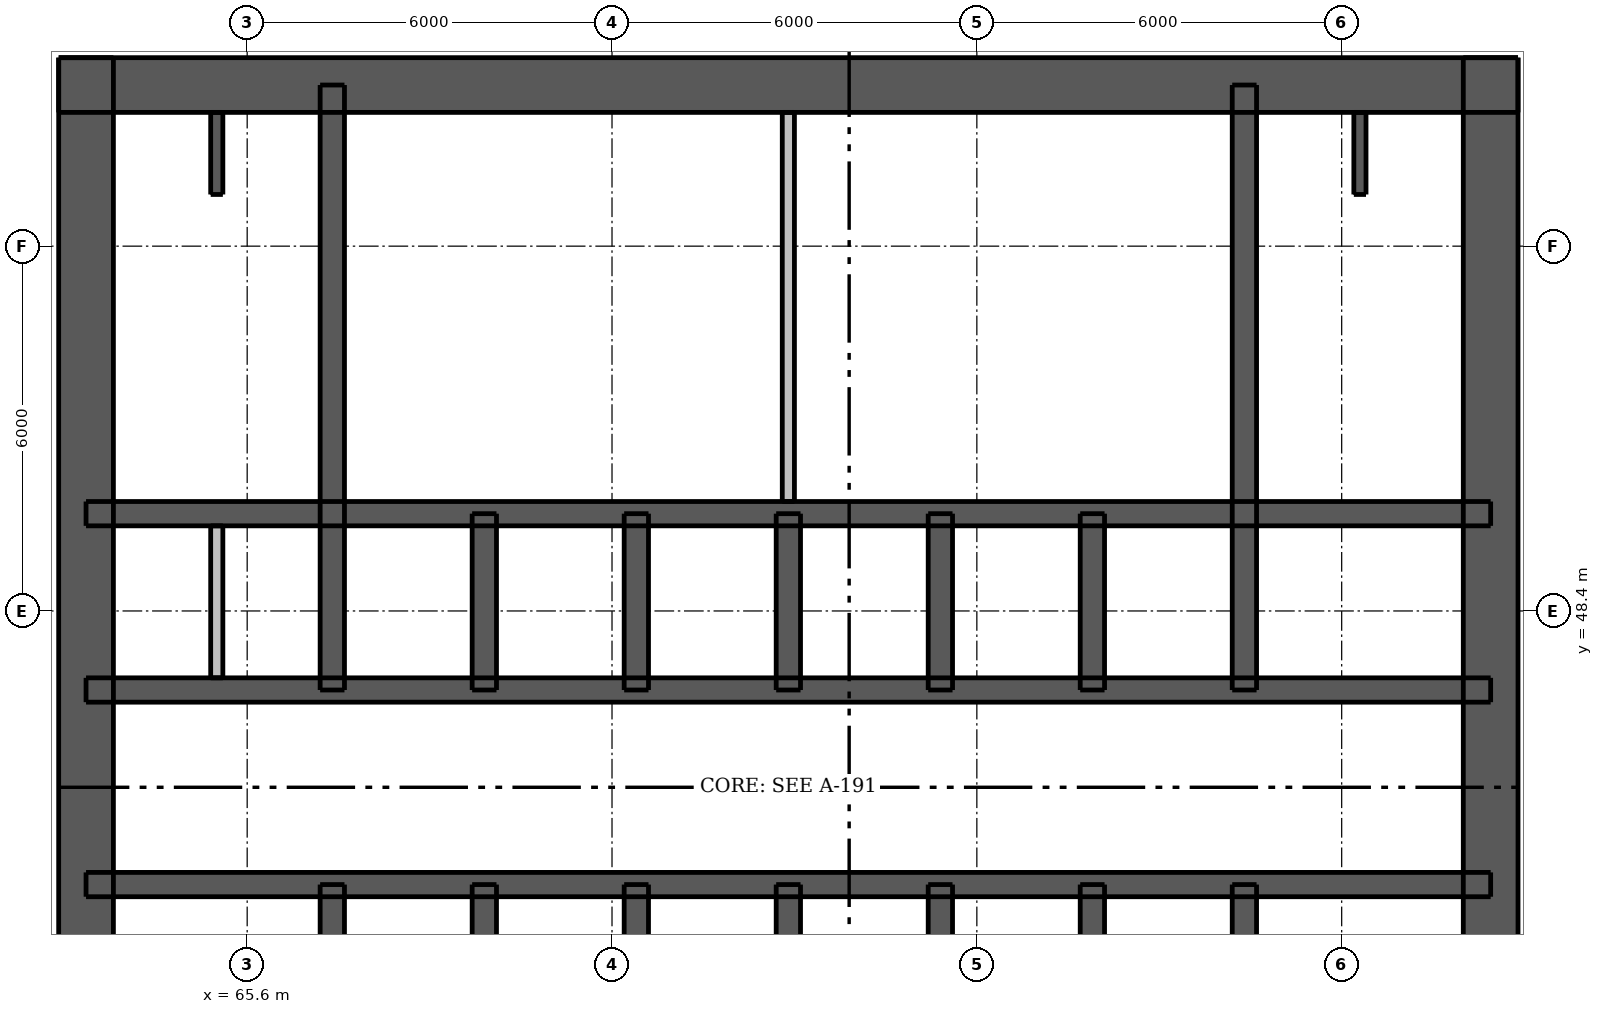
"""IFC4 building model, lengths in metres.
Left out: names, types, materials, properties, quantities, classifications, styles, units other than length and angle.
Written with IfcOpenShell. Run it as: python <this file> out.ifc"""

import sys

from ifc_helpers import new_model, si_unit, direction, frame, frame_2d, origin, place, context, subcontext, project, spatial, rectangle, extrude, element, fill, save


model = new_model("IFC4")
c1 = context("Model", 3, precision=1e-05, world=origin(), true_north=direction((0.0, 1.0)))
c2 = subcontext(c1, "Body", "Model", "MODEL_VIEW")
j1 = project(units=[si_unit("LENGTHUNIT", "METRE"), si_unit("PLANEANGLEUNIT", "RADIAN")], contexts=[c1])
p1 = place(None, origin())
s1 = spatial("IfcSite", under=j1, at=p1, CompositionType="ELEMENT")
p2 = place(p1, origin())
s2 = spatial("IfcBuilding", under=s1, at=p2, CompositionType="ELEMENT")
p3 = place(p2, frame((0.0, 0.0, 69.7)))
s3 = spatial("IfcBuildingStorey", under=s2, at=p3, CompositionType="ELEMENT", Elevation=69.7)
p4 = place(p3, frame((62.5, 57.05, 0.0), z_axis=(0.0, 0.0, 1.0), x_axis=(1.0, 0.0, 0.0)))
e1 = element("IfcWall", 1, at=p4, inside=s3, PredefinedType="SHEAR", context=c2, shape_type="SweptSolid", body=[
    extrude(rectangle(XDim=24.0, YDim=0.9, at=frame_2d((12.0, 0.0))), origin(), (0.0, 0.0, 1.0), 8.75),
])
p5 = place(p4, frame((19.9, 0.0, 0.0)))
e2 = element("IfcOpeningElement", 2, at=p5, cuts=e1, PredefinedType="OPENING", context=c2, shape_type="SweptSolid", body=[
    extrude(rectangle(XDim=1.1, YDim=2.1, at=frame_2d((0.55, 1.05))), frame((0.0, 0.46, 0.0), z_axis=(0.0, -1.0, 0.0), x_axis=(1.0, 0.0, 0.0)), (0.0, 0.0, 1.0), 0.92),
])
p6 = place(p4, frame((21.8, 0.0, 0.0)))
e3 = element("IfcOpeningElement", 3, at=p6, cuts=e1, PredefinedType="OPENING", context=c2, shape_type="SweptSolid", body=[
    extrude(rectangle(XDim=1.1, YDim=2.1, at=frame_2d((0.55, 1.05))), frame((0.0, 0.46, 0.0), z_axis=(0.0, -1.0, 0.0), x_axis=(1.0, 0.0, 0.0)), (0.0, 0.0, 1.0), 0.92),
])
p7 = place(p4, frame((1.1, 0.0, 0.0)))
e4 = element("IfcOpeningElement", 4, at=p7, cuts=e1, PredefinedType="OPENING", context=c2, shape_type="SweptSolid", body=[
    extrude(rectangle(XDim=1.1, YDim=2.1, at=frame_2d((0.55, 1.05))), frame((0.0, 0.46, 0.0), z_axis=(0.0, -1.0, 0.0), x_axis=(1.0, 0.0, 0.0)), (0.0, 0.0, 1.0), 0.92),
])
p8 = place(p4, frame((3.0, 0.0, 0.0)))
e5 = element("IfcOpeningElement", 5, at=p8, cuts=e1, PredefinedType="OPENING", context=c2, shape_type="SweptSolid", body=[
    extrude(rectangle(XDim=1.1, YDim=2.1, at=frame_2d((0.55, 1.05))), frame((0.0, 0.46, 0.0), z_axis=(0.0, -1.0, 0.0), x_axis=(1.0, 0.0, 0.0)), (0.0, 0.0, 1.0), 0.92),
])
p9 = place(p4, frame((7.15, 0.0, 0.0)))
e6 = element("IfcOpeningElement", 6, at=p9, cuts=e1, PredefinedType="OPENING", context=c2, shape_type="SweptSolid", body=[
    extrude(rectangle(XDim=0.9, YDim=2.1, at=frame_2d((0.45, 1.05))), frame((0.0, 0.46, 0.0), z_axis=(0.0, -1.0, 0.0), x_axis=(1.0, 0.0, 0.0)), (0.0, 0.0, 1.0), 0.92),
])
p10 = place(p4, frame((16.05, 0.0, 0.0)))
e7 = element("IfcOpeningElement", 7, at=p10, cuts=e1, PredefinedType="OPENING", context=c2, shape_type="SweptSolid", body=[
    extrude(rectangle(XDim=0.9, YDim=2.1, at=frame_2d((0.45, 1.05))), frame((0.0, 0.46, 0.0), z_axis=(0.0, -1.0, 0.0), x_axis=(1.0, 0.0, 0.0)), (0.0, 0.0, 1.0), 0.92),
])
p11 = place(p3, frame((62.95, 33.5, 0.0), z_axis=(0.0, 0.0, 1.0), x_axis=(0.0, 1.0, 0.0)))
e8 = element("IfcWall", 8, at=p11, inside=s3, PredefinedType="SHEAR", context=c2, shape_type="SweptSolid", body=[
    extrude(rectangle(XDim=24.0, YDim=0.9, at=frame_2d((12.0, 0.0))), origin(), (0.0, 0.0, 1.0), 8.75),
])
p12 = place(p11, frame((11.2, 0.0, 0.0)))
e9 = element("IfcOpeningElement", 9, at=p12, cuts=e8, PredefinedType="OPENING", context=c2, shape_type="SweptSolid", body=[
    extrude(rectangle(XDim=1.6, YDim=2.1, at=frame_2d((0.8, 1.05))), frame((0.0, 0.46, 0.0), z_axis=(0.0, -1.0, 0.0), x_axis=(1.0, 0.0, 0.0)), (0.0, 0.0, 1.0), 0.92),
])
p13 = place(p3, frame((86.05, 33.5, 0.0), z_axis=(0.0, 0.0, 1.0), x_axis=(0.0, 1.0, 0.0)))
e10 = element("IfcWall", 10, at=p13, inside=s3, PredefinedType="SHEAR", context=c2, shape_type="SweptSolid", body=[
    extrude(rectangle(XDim=24.0, YDim=0.9, at=frame_2d((12.0, 0.0))), origin(), (0.0, 0.0, 1.0), 8.75),
])
p14 = place(p13, frame((11.2, 0.0, 0.0)))
e11 = element("IfcOpeningElement", 11, at=p14, cuts=e10, PredefinedType="OPENING", context=c2, shape_type="SweptSolid", body=[
    extrude(rectangle(XDim=1.6, YDim=2.1, at=frame_2d((0.8, 1.05))), frame((0.0, 0.46, 0.0), z_axis=(0.0, -1.0, 0.0), x_axis=(1.0, 0.0, 0.0)), (0.0, 0.0, 1.0), 0.92),
])
p15 = place(p3, frame((62.95, 43.9, 0.0), z_axis=(0.0, 0.0, 1.0), x_axis=(1.0, 0.0, 0.0)))
e12 = element("IfcWall", 12, at=p15, inside=s3, PredefinedType="SHEAR", context=c2, shape_type="SweptSolid", body=[
    extrude(rectangle(XDim=23.1, YDim=0.4, at=frame_2d((11.55, 0.0))), origin(), (0.0, 0.0, 1.0), 8.75),
])
p16 = place(p15, frame((1.7, 0.0, 0.0)))
e13 = element("IfcOpeningElement", 13, at=p16, cuts=e12, PredefinedType="OPENING", context=c2, shape_type="SweptSolid", body=[
    extrude(rectangle(XDim=0.9, YDim=2.1, at=frame_2d((0.45, 1.05))), frame((0.0, 0.21, 0.0), z_axis=(0.0, -1.0, 0.0), x_axis=(1.0, 0.0, 0.0)), (0.0, 0.0, 1.0), 0.42),
])
p17 = place(p15, frame((20.5, 0.0, 0.0)))
e14 = element("IfcOpeningElement", 14, at=p17, cuts=e12, PredefinedType="OPENING", context=c2, shape_type="SweptSolid", body=[
    extrude(rectangle(XDim=0.9, YDim=2.1, at=frame_2d((0.45, 1.05))), frame((0.0, 0.21, 0.0), z_axis=(0.0, -1.0, 0.0), x_axis=(1.0, 0.0, 0.0)), (0.0, 0.0, 1.0), 0.42),
])
p18 = place(p15, frame((4.75, 0.0, 0.0)))
e15 = element("IfcOpeningElement", 15, at=p18, cuts=e12, PredefinedType="OPENING", context=c2, shape_type="SweptSolid", body=[
    extrude(rectangle(XDim=1.1, YDim=2.1, at=frame_2d((0.55, 1.05))), frame((0.0, 0.21, 0.0), z_axis=(0.0, -1.0, 0.0), x_axis=(1.0, 0.0, 0.0)), (0.0, 0.0, 1.0), 0.42),
])
p19 = place(p15, frame((7.25, 0.0, 0.0)))
e16 = element("IfcOpeningElement", 16, at=p19, cuts=e12, PredefinedType="OPENING", context=c2, shape_type="SweptSolid", body=[
    extrude(rectangle(XDim=1.1, YDim=2.1, at=frame_2d((0.55, 1.05))), frame((0.0, 0.21, 0.0), z_axis=(0.0, -1.0, 0.0), x_axis=(1.0, 0.0, 0.0)), (0.0, 0.0, 1.0), 0.42),
])
p20 = place(p15, frame((9.75, 0.0, 0.0)))
e17 = element("IfcOpeningElement", 17, at=p20, cuts=e12, PredefinedType="OPENING", context=c2, shape_type="SweptSolid", body=[
    extrude(rectangle(XDim=1.1, YDim=2.1, at=frame_2d((0.55, 1.05))), frame((0.0, 0.21, 0.0), z_axis=(0.0, -1.0, 0.0), x_axis=(1.0, 0.0, 0.0)), (0.0, 0.0, 1.0), 0.42),
])
p21 = place(p15, frame((12.25, 0.0, 0.0)))
e18 = element("IfcOpeningElement", 18, at=p21, cuts=e12, PredefinedType="OPENING", context=c2, shape_type="SweptSolid", body=[
    extrude(rectangle(XDim=1.1, YDim=2.1, at=frame_2d((0.55, 1.05))), frame((0.0, 0.21, 0.0), z_axis=(0.0, -1.0, 0.0), x_axis=(1.0, 0.0, 0.0)), (0.0, 0.0, 1.0), 0.42),
])
p22 = place(p15, frame((14.75, 0.0, 0.0)))
e19 = element("IfcOpeningElement", 19, at=p22, cuts=e12, PredefinedType="OPENING", context=c2, shape_type="SweptSolid", body=[
    extrude(rectangle(XDim=1.1, YDim=2.1, at=frame_2d((0.55, 1.05))), frame((0.0, 0.21, 0.0), z_axis=(0.0, -1.0, 0.0), x_axis=(1.0, 0.0, 0.0)), (0.0, 0.0, 1.0), 0.42),
])
p23 = place(p15, frame((17.25, 0.0, 0.0)))
e20 = element("IfcOpeningElement", 20, at=p23, cuts=e12, PredefinedType="OPENING", context=c2, shape_type="SweptSolid", body=[
    extrude(rectangle(XDim=1.1, YDim=2.1, at=frame_2d((0.55, 1.05))), frame((0.0, 0.21, 0.0), z_axis=(0.0, -1.0, 0.0), x_axis=(1.0, 0.0, 0.0)), (0.0, 0.0, 1.0), 0.42),
])
p24 = place(p3, frame((62.95, 47.1, 0.0), z_axis=(0.0, 0.0, 1.0), x_axis=(1.0, 0.0, 0.0)))
e21 = element("IfcWall", 21, at=p24, inside=s3, PredefinedType="SHEAR", context=c2, shape_type="SweptSolid", body=[
    extrude(rectangle(XDim=23.1, YDim=0.4, at=frame_2d((11.55, 0.0))), origin(), (0.0, 0.0, 1.0), 8.75),
])
p25 = place(p24, frame((0.85, 0.0, 0.0)))
e22 = element("IfcOpeningElement", 22, at=p25, cuts=e21, PredefinedType="OPENING", context=c2, shape_type="SweptSolid", body=[
    extrude(rectangle(XDim=0.9, YDim=2.1, at=frame_2d((0.45, 1.05))), frame((0.0, 0.21, 0.0), z_axis=(0.0, -1.0, 0.0), x_axis=(1.0, 0.0, 0.0)), (0.0, 0.0, 1.0), 0.42),
])
p26 = place(p24, frame((2.55, 0.0, 0.0)))
e23 = element("IfcOpeningElement", 23, at=p26, cuts=e21, PredefinedType="OPENING", context=c2, shape_type="SweptSolid", body=[
    extrude(rectangle(XDim=0.9, YDim=2.1, at=frame_2d((0.45, 1.05))), frame((0.0, 0.21, 0.0), z_axis=(0.0, -1.0, 0.0), x_axis=(1.0, 0.0, 0.0)), (0.0, 0.0, 1.0), 0.42),
])
p27 = place(p24, frame((20.5, 0.0, 0.0)))
e24 = element("IfcOpeningElement", 24, at=p27, cuts=e21, PredefinedType="OPENING", context=c2, shape_type="SweptSolid", body=[
    extrude(rectangle(XDim=0.9, YDim=2.1, at=frame_2d((0.45, 1.05))), frame((0.0, 0.21, 0.0), z_axis=(0.0, -1.0, 0.0), x_axis=(1.0, 0.0, 0.0)), (0.0, 0.0, 1.0), 0.42),
])
p28 = place(p3, frame((62.95, 50.0, 0.0), z_axis=(0.0, 0.0, 1.0), x_axis=(1.0, 0.0, 0.0)))
e25 = element("IfcWall", 25, at=p28, inside=s3, PredefinedType="SHEAR", context=c2, shape_type="SweptSolid", body=[
    extrude(rectangle(XDim=23.1, YDim=0.4, at=frame_2d((11.55, 0.0))), origin(), (0.0, 0.0, 1.0), 8.75),
])
for number, where, z_axis, x_axis in (
    (26, (67.0, 33.95, 0.0), (0.0, 0.0, 1.0), (0.0, 1.0, 0.0)),
    (27, (67.0, 47.1, 0.0), (0.0, 0.0, 1.0), (0.0, 1.0, 0.0)),
    (28, (82.0, 33.95, 0.0), (0.0, 0.0, 1.0), (0.0, 1.0, 0.0)),
    (29, (82.0, 47.1, 0.0), (0.0, 0.0, 1.0), (0.0, 1.0, 0.0)),
):
    element("IfcWall", number, at=place(p3, frame(where, z_axis=z_axis, x_axis=x_axis)), inside=s3, PredefinedType="SHEAR", context=c2, shape_type="SweptSolid", body=[
        extrude(rectangle(XDim=9.95, YDim=0.4, at=frame_2d((4.975, 0.0))), origin(), (0.0, 0.0, 1.0), 8.75),
    ])
for number, where, z_axis, x_axis in (
    (30, (69.5, 41.0, 0.0), (0.0, 0.0, 1.0), (0.0, 1.0, 0.0)),
    (31, (69.5, 47.1, 0.0), (0.0, 0.0, 1.0), (0.0, 1.0, 0.0)),
    (32, (72.0, 41.0, 0.0), (0.0, 0.0, 1.0), (0.0, 1.0, 0.0)),
    (33, (72.0, 47.1, 0.0), (0.0, 0.0, 1.0), (0.0, 1.0, 0.0)),
    (34, (74.5, 41.0, 0.0), (0.0, 0.0, 1.0), (0.0, 1.0, 0.0)),
    (35, (74.5, 47.1, 0.0), (0.0, 0.0, 1.0), (0.0, 1.0, 0.0)),
    (36, (77.0, 41.0, 0.0), (0.0, 0.0, 1.0), (0.0, 1.0, 0.0)),
    (37, (77.0, 47.1, 0.0), (0.0, 0.0, 1.0), (0.0, 1.0, 0.0)),
    (38, (79.5, 41.0, 0.0), (0.0, 0.0, 1.0), (0.0, 1.0, 0.0)),
    (39, (79.5, 47.1, 0.0), (0.0, 0.0, 1.0), (0.0, 1.0, 0.0)),
):
    element("IfcWall", number, at=place(p3, frame(where, z_axis=z_axis, x_axis=x_axis)), inside=s3, PredefinedType="SHEAR", context=c2, shape_type="SweptSolid", body=[
        extrude(rectangle(XDim=2.9, YDim=0.4, at=frame_2d((1.45, 0.0))), origin(), (0.0, 0.0, 1.0), 8.75),
    ])
p29 = place(p3, frame((65.1, 47.3, 0.0), z_axis=(0.0, 0.0, 1.0), x_axis=(0.0, 1.0, 0.0)))
e40 = element("IfcWall", 40, at=p29, inside=s3, PredefinedType="PLUMBINGWALL", context=c2, shape_type="SweptSolid", body=[
    extrude(rectangle(XDim=2.5, YDim=0.2, at=frame_2d((1.25, 0.0))), origin(), (0.0, 0.0, 1.0), 8.75),
])
p30 = place(p3, frame((74.5, 50.2, 0.0), z_axis=(0.0, 0.0, 1.0), x_axis=(0.0, 1.0, 0.0)))
e41 = element("IfcWall", 41, at=p30, inside=s3, PredefinedType="PLUMBINGWALL", context=c2, shape_type="SweptSolid", body=[
    extrude(rectangle(XDim=6.4, YDim=0.2, at=frame_2d((3.2, 0.0))), origin(), (0.0, 0.0, 1.0), 8.75),
])
for number, where, z_axis, x_axis in (
    (42, (83.9, 56.6, 0.0), (0.0, 0.0, 1.0), (0.0, -1.0, 0.0)),
    (43, (65.1, 56.6, 0.0), (0.0, 0.0, 1.0), (0.0, -1.0, 0.0)),
):
    element("IfcWall", number, at=place(p3, frame(where, z_axis=z_axis, x_axis=x_axis)), inside=s3, PredefinedType="SHEAR", context=c2, shape_type="SweptSolid", body=[
        extrude(rectangle(XDim=1.35, YDim=0.2, at=frame_2d((0.675, 0.0))), origin(), (0.0, 0.0, 1.0), 8.75),
    ])
p31 = place(p5, origin())
e44 = element("IfcDoor", 44, at=p31, inside=s3, OperationType="SINGLE_SWING_RIGHT", PredefinedType="DOOR", context=c2, shape_type="SweptSolid", body=[
    extrude(rectangle(XDim=1.1, YDim=2.1, at=frame_2d((0.55, 1.05))), frame((0.0, -0.388, 0.0), z_axis=(0.0, -1.0, 0.0), x_axis=(1.0, 0.0, 0.0)), (0.0, 0.0, 1.0), 0.05),
])
fill(e2, e44)
p32 = place(p6, origin())
e45 = element("IfcDoor", 45, at=p32, inside=s3, OperationType="SINGLE_SWING_RIGHT", PredefinedType="DOOR", context=c2, shape_type="SweptSolid", body=[
    extrude(rectangle(XDim=1.1, YDim=2.1, at=frame_2d((0.55, 1.05))), frame((0.0, -0.388, 0.0), z_axis=(0.0, -1.0, 0.0), x_axis=(1.0, 0.0, 0.0)), (0.0, 0.0, 1.0), 0.05),
])
fill(e3, e45)
p33 = place(p7, origin())
e46 = element("IfcDoor", 46, at=p33, inside=s3, OperationType="SINGLE_SWING_LEFT", PredefinedType="DOOR", context=c2, shape_type="SweptSolid", body=[
    extrude(rectangle(XDim=1.1, YDim=2.1, at=frame_2d((0.55, 1.05))), frame((0.0, -0.388, 0.0), z_axis=(0.0, -1.0, 0.0), x_axis=(1.0, 0.0, 0.0)), (0.0, 0.0, 1.0), 0.05),
])
fill(e4, e46)
p34 = place(p8, origin())
e47 = element("IfcDoor", 47, at=p34, inside=s3, OperationType="SINGLE_SWING_LEFT", PredefinedType="DOOR", context=c2, shape_type="SweptSolid", body=[
    extrude(rectangle(XDim=1.1, YDim=2.1, at=frame_2d((0.55, 1.05))), frame((0.0, -0.388, 0.0), z_axis=(0.0, -1.0, 0.0), x_axis=(1.0, 0.0, 0.0)), (0.0, 0.0, 1.0), 0.05),
])
fill(e5, e47)
p35 = place(p12, origin())
e48 = element("IfcDoor", 48, at=p35, inside=s3, OperationType="DOUBLE_DOOR_SINGLE_SWING", PredefinedType="DOOR", context=c2, shape_type="SweptSolid", body=[
    extrude(rectangle(XDim=1.6, YDim=2.1, at=frame_2d((0.8, 1.05))), frame((0.0, -0.388, 0.0), z_axis=(0.0, -1.0, 0.0), x_axis=(1.0, 0.0, 0.0)), (0.0, 0.0, 1.0), 0.05),
])
fill(e9, e48)
p36 = place(p14, origin())
e49 = element("IfcDoor", 49, at=p36, inside=s3, OperationType="DOUBLE_DOOR_SINGLE_SWING", PredefinedType="DOOR", context=c2, shape_type="SweptSolid", body=[
    extrude(rectangle(XDim=1.6, YDim=2.1, at=frame_2d((0.8, 1.05))), frame((0.0, 0.438, 0.0), z_axis=(0.0, -1.0, 0.0), x_axis=(1.0, 0.0, 0.0)), (0.0, 0.0, 1.0), 0.05),
])
fill(e11, e49)
p37 = place(p16, origin())
e50 = element("IfcDoor", 50, at=p37, inside=s3, OperationType="SINGLE_SWING_LEFT", PredefinedType="DOOR", context=c2, shape_type="SweptSolid", body=[
    extrude(rectangle(XDim=0.9, YDim=2.1, at=frame_2d((0.45, 1.05))), frame((0.0, -0.138, 0.0), z_axis=(0.0, -1.0, 0.0), x_axis=(1.0, 0.0, 0.0)), (0.0, 0.0, 1.0), 0.05),
])
fill(e13, e50)
p38 = place(p17, origin())
e51 = element("IfcDoor", 51, at=p38, inside=s3, OperationType="SINGLE_SWING_LEFT", PredefinedType="DOOR", context=c2, shape_type="SweptSolid", body=[
    extrude(rectangle(XDim=0.9, YDim=2.1, at=frame_2d((0.45, 1.05))), frame((0.0, -0.138, 0.0), z_axis=(0.0, -1.0, 0.0), x_axis=(1.0, 0.0, 0.0)), (0.0, 0.0, 1.0), 0.05),
])
fill(e14, e51)
p39 = place(p25, origin())
e52 = element("IfcDoor", 52, at=p39, inside=s3, OperationType="SINGLE_SWING_LEFT", PredefinedType="DOOR", context=c2, shape_type="SweptSolid", body=[
    extrude(rectangle(XDim=0.9, YDim=2.1, at=frame_2d((0.45, 1.05))), frame((0.0, 0.188, 0.0), z_axis=(0.0, -1.0, 0.0), x_axis=(1.0, 0.0, 0.0)), (0.0, 0.0, 1.0), 0.05),
])
fill(e22, e52)
p40 = place(p26, origin())
e53 = element("IfcDoor", 53, at=p40, inside=s3, OperationType="SINGLE_SWING_RIGHT", PredefinedType="DOOR", context=c2, shape_type="SweptSolid", body=[
    extrude(rectangle(XDim=0.9, YDim=2.1, at=frame_2d((0.45, 1.05))), frame((0.0, 0.188, 0.0), z_axis=(0.0, -1.0, 0.0), x_axis=(1.0, 0.0, 0.0)), (0.0, 0.0, 1.0), 0.05),
])
fill(e23, e53)
p41 = place(p27, origin())
e54 = element("IfcDoor", 54, at=p41, inside=s3, OperationType="SINGLE_SWING_LEFT", PredefinedType="DOOR", context=c2, shape_type="SweptSolid", body=[
    extrude(rectangle(XDim=0.9, YDim=2.1, at=frame_2d((0.45, 1.05))), frame((0.0, 0.188, 0.0), z_axis=(0.0, -1.0, 0.0), x_axis=(1.0, 0.0, 0.0)), (0.0, 0.0, 1.0), 0.05),
])
fill(e24, e54)
p42 = place(p9, origin())
e55 = element("IfcDoor", 55, at=p42, inside=s3, OperationType="SINGLE_SWING_RIGHT", PredefinedType="DOOR", context=c2, shape_type="SweptSolid", body=[
    extrude(rectangle(XDim=0.9, YDim=2.1, at=frame_2d((0.45, 1.05))), frame((0.0, -0.388, 0.0), z_axis=(0.0, -1.0, 0.0), x_axis=(1.0, 0.0, 0.0)), (0.0, 0.0, 1.0), 0.05),
])
fill(e6, e55)
p43 = place(p10, origin())
e56 = element("IfcDoor", 56, at=p43, inside=s3, OperationType="SINGLE_SWING_RIGHT", PredefinedType="DOOR", context=c2, shape_type="SweptSolid", body=[
    extrude(rectangle(XDim=0.9, YDim=2.1, at=frame_2d((0.45, 1.05))), frame((0.0, -0.388, 0.0), z_axis=(0.0, -1.0, 0.0), x_axis=(1.0, 0.0, 0.0)), (0.0, 0.0, 1.0), 0.05),
])
fill(e7, e56)
p44 = place(p18, origin())
e57 = element("IfcDoor", 57, at=p44, inside=s3, OperationType="DOUBLE_DOOR_SLIDING", PredefinedType="DOOR", context=c2, shape_type="SweptSolid", body=[
    extrude(rectangle(XDim=1.1, YDim=2.1, at=frame_2d((0.55, 1.05))), frame((0.0, 0.025, 0.0), z_axis=(0.0, -1.0, 0.0), x_axis=(1.0, 0.0, 0.0)), (0.0, 0.0, 1.0), 0.05),
])
fill(e15, e57)
p45 = place(p19, origin())
e58 = element("IfcDoor", 58, at=p45, inside=s3, OperationType="DOUBLE_DOOR_SLIDING", PredefinedType="DOOR", context=c2, shape_type="SweptSolid", body=[
    extrude(rectangle(XDim=1.1, YDim=2.1, at=frame_2d((0.55, 1.05))), frame((0.0, 0.025, 0.0), z_axis=(0.0, -1.0, 0.0), x_axis=(1.0, 0.0, 0.0)), (0.0, 0.0, 1.0), 0.05),
])
fill(e16, e58)
p46 = place(p20, origin())
e59 = element("IfcDoor", 59, at=p46, inside=s3, OperationType="DOUBLE_DOOR_SLIDING", PredefinedType="DOOR", context=c2, shape_type="SweptSolid", body=[
    extrude(rectangle(XDim=1.1, YDim=2.1, at=frame_2d((0.55, 1.05))), frame((0.0, 0.025, 0.0), z_axis=(0.0, -1.0, 0.0), x_axis=(1.0, 0.0, 0.0)), (0.0, 0.0, 1.0), 0.05),
])
fill(e17, e59)
p47 = place(p21, origin())
e60 = element("IfcDoor", 60, at=p47, inside=s3, OperationType="DOUBLE_DOOR_SLIDING", PredefinedType="DOOR", context=c2, shape_type="SweptSolid", body=[
    extrude(rectangle(XDim=1.1, YDim=2.1, at=frame_2d((0.55, 1.05))), frame((0.0, 0.025, 0.0), z_axis=(0.0, -1.0, 0.0), x_axis=(1.0, 0.0, 0.0)), (0.0, 0.0, 1.0), 0.05),
])
fill(e18, e60)
p48 = place(p22, origin())
e61 = element("IfcDoor", 61, at=p48, inside=s3, OperationType="DOUBLE_DOOR_SLIDING", PredefinedType="DOOR", context=c2, shape_type="SweptSolid", body=[
    extrude(rectangle(XDim=1.1, YDim=2.1, at=frame_2d((0.55, 1.05))), frame((0.0, 0.025, 0.0), z_axis=(0.0, -1.0, 0.0), x_axis=(1.0, 0.0, 0.0)), (0.0, 0.0, 1.0), 0.05),
])
fill(e19, e61)
p49 = place(p23, origin())
e62 = element("IfcDoor", 62, at=p49, inside=s3, OperationType="DOUBLE_DOOR_SLIDING", PredefinedType="DOOR", context=c2, shape_type="SweptSolid", body=[
    extrude(rectangle(XDim=1.1, YDim=2.1, at=frame_2d((0.55, 1.05))), frame((0.0, 0.025, 0.0), z_axis=(0.0, -1.0, 0.0), x_axis=(1.0, 0.0, 0.0)), (0.0, 0.0, 1.0), 0.05),
])
fill(e20, e62)
save(model, sys.argv[1])
